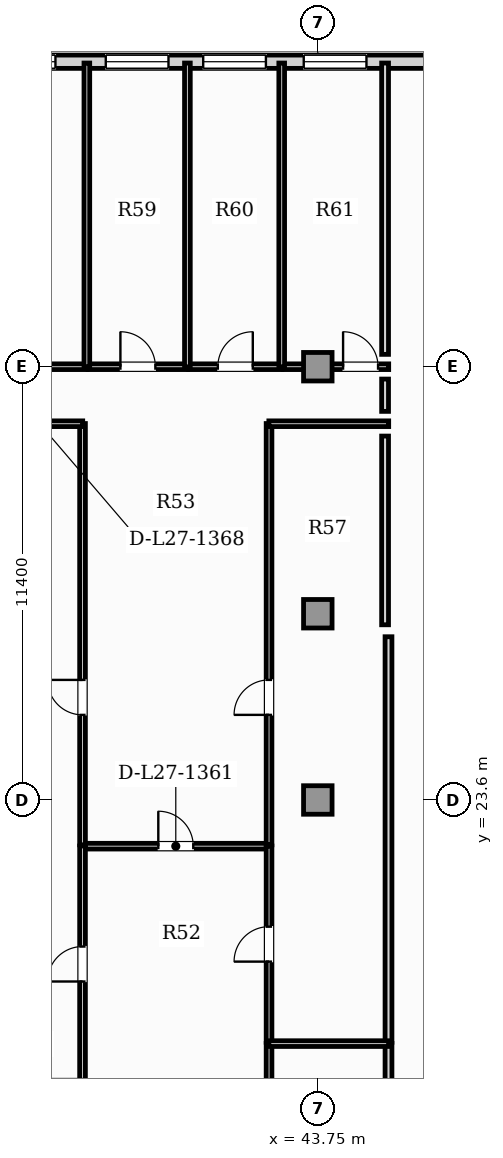
"""IFC4 building model, lengths in metres.
Left out: names, types, materials, properties, quantities, classifications, styles, units other than length and angle.
Written with IfcOpenShell. Run it as: python <this file> out.ifc"""

import sys

from ifc_helpers import new_model, si_unit, direction, frame, frame_2d, origin, origin_2d, place, context, subcontext, project, spatial, rectangle, extrude, element, fill, save


model = new_model("IFC4")
c1 = context("Model", 3, precision=1e-05, world=origin(), true_north=direction((0.0, 1.0)))
c2 = subcontext(c1, "Body", "Model", "MODEL_VIEW")
j1 = project(units=[si_unit("LENGTHUNIT", "METRE"), si_unit("PLANEANGLEUNIT", "RADIAN")], contexts=[c1])
p1 = place(None, origin())
s1 = spatial("IfcSite", under=j1, at=p1, CompositionType="ELEMENT")
p2 = place(p1, origin())
s2 = spatial("IfcBuilding", under=s1, at=p2, CompositionType="ELEMENT")
p3 = place(p2, frame((0.0, 0.0, 111.85)))
s3 = spatial("IfcBuildingStorey", under=s2, at=p3, CompositionType="ELEMENT", Elevation=111.85)
for number, where, z_axis, x_axis in (
    (1, (43.75, 23.6, 0.0), (0.0, 0.0, 1.0), (1.0, 0.0, 0.0)),
    (2, (43.75, 28.5, 0.0), (0.0, 0.0, 1.0), (1.0, 0.0, 0.0)),
    (3, (43.75, 35.0, 0.0), (0.0, 0.0, 1.0), (1.0, 0.0, 0.0)),
):
    element("IfcColumn", number, at=place(p3, frame(where, z_axis=z_axis, x_axis=x_axis)), inside=s3, PredefinedType="COLUMN", context=c2, shape_type="SweptSolid", body=[
        extrude(rectangle(XDim=0.75, YDim=0.75, at=origin_2d()), origin(), (0.0, 0.0, 1.0), 3.85),
    ])
p4 = place(p3, frame((51.66, 43.025, 0.0), z_axis=(0.0, 0.0, 1.0), x_axis=(-1.0, 0.0, 0.0)))
e4 = element("IfcWall", 4, at=p4, inside=s3, PredefinedType="SOLIDWALL", context=c2, shape_type="SweptSolid", body=[
    extrude(rectangle(XDim=45.82, YDim=0.35, at=frame_2d((22.91, 0.0))), origin(), (0.0, 0.0, 1.0), 3.6),
])
p5 = place(p4, frame((42.393, 0.0, 0.88)))
e5 = element("IfcOpeningElement", 5, at=p5, cuts=e4, PredefinedType="OPENING", context=c2, shape_type="SweptSolid", body=[
    extrude(rectangle(XDim=1.65, YDim=2.0, at=frame_2d((0.825, 1.0))), frame((0.0, 0.185, 0.0), z_axis=(0.0, -1.0, 0.0), x_axis=(1.0, 0.0, 0.0)), (0.0, 0.0, 1.0), 0.37),
])
p6 = place(p4, frame((1.778, 0.0, 0.88)))
e6 = element("IfcOpeningElement", 6, at=p6, cuts=e4, PredefinedType="OPENING", context=c2, shape_type="SweptSolid", body=[
    extrude(rectangle(XDim=1.65, YDim=2.0, at=frame_2d((0.825, 1.0))), frame((0.0, 0.185, 0.0), z_axis=(0.0, -1.0, 0.0), x_axis=(1.0, 0.0, 0.0)), (0.0, 0.0, 1.0), 0.37),
])
p7 = place(p4, frame((37.293, 0.0, 0.88)))
e7 = element("IfcOpeningElement", 7, at=p7, cuts=e4, PredefinedType="OPENING", context=c2, shape_type="SweptSolid", body=[
    extrude(rectangle(XDim=1.65, YDim=2.0, at=frame_2d((0.825, 1.0))), frame((0.0, 0.185, 0.0), z_axis=(0.0, -1.0, 0.0), x_axis=(1.0, 0.0, 0.0)), (0.0, 0.0, 1.0), 0.37),
])
p8 = place(p4, frame((34.694, 0.0, 0.95)))
e8 = element("IfcOpeningElement", 8, at=p8, cuts=e4, PredefinedType="OPENING", context=c2, shape_type="SweptSolid", body=[
    extrude(rectangle(XDim=0.9, YDim=1.5, at=frame_2d((0.45, 0.75))), frame((0.0, 0.185, 0.0), z_axis=(0.0, -1.0, 0.0), x_axis=(1.0, 0.0, 0.0)), (0.0, 0.0, 1.0), 0.37),
])
p9 = place(p4, frame((31.734, 0.0, 1.82)))
e9 = element("IfcOpeningElement", 9, at=p9, cuts=e4, PredefinedType="OPENING", context=c2, shape_type="SweptSolid", body=[
    extrude(rectangle(XDim=0.9, YDim=1.05, at=frame_2d((0.45, 0.525))), frame((0.0, 0.185, 0.0), z_axis=(0.0, -1.0, 0.0), x_axis=(1.0, 0.0, 0.0)), (0.0, 0.0, 1.0), 0.37),
])
p10 = place(p4, frame((29.11, 0.0, 0.88)))
e10 = element("IfcOpeningElement", 10, at=p10, cuts=e4, PredefinedType="OPENING", context=c2, shape_type="SweptSolid", body=[
    extrude(rectangle(XDim=1.65, YDim=2.0, at=frame_2d((0.825, 1.0))), frame((0.0, 0.185, 0.0), z_axis=(0.0, -1.0, 0.0), x_axis=(1.0, 0.0, 0.0)), (0.0, 0.0, 1.0), 0.37),
])
p11 = place(p4, frame((26.053, 0.0, 0.88)))
e11 = element("IfcOpeningElement", 11, at=p11, cuts=e4, PredefinedType="OPENING", context=c2, shape_type="SweptSolid", body=[
    extrude(rectangle(XDim=1.65, YDim=2.0, at=frame_2d((0.825, 1.0))), frame((0.0, 0.185, 0.0), z_axis=(0.0, -1.0, 0.0), x_axis=(1.0, 0.0, 0.0)), (0.0, 0.0, 1.0), 0.37),
])
p12 = place(p4, frame((23.243, 0.0, 0.88)))
e12 = element("IfcOpeningElement", 12, at=p12, cuts=e4, PredefinedType="OPENING", context=c2, shape_type="SweptSolid", body=[
    extrude(rectangle(XDim=1.65, YDim=2.0, at=frame_2d((0.825, 1.0))), frame((0.0, 0.185, 0.0), z_axis=(0.0, -1.0, 0.0), x_axis=(1.0, 0.0, 0.0)), (0.0, 0.0, 1.0), 0.37),
])
p13 = place(p4, frame((20.844, 0.0, 0.88)))
e13 = element("IfcOpeningElement", 13, at=p13, cuts=e4, PredefinedType="OPENING", context=c2, shape_type="SweptSolid", body=[
    extrude(rectangle(XDim=1.65, YDim=2.0, at=frame_2d((0.825, 1.0))), frame((0.0, 0.185, 0.0), z_axis=(0.0, -1.0, 0.0), x_axis=(1.0, 0.0, 0.0)), (0.0, 0.0, 1.0), 0.37),
])
p14 = place(p4, frame((18.034, 0.0, 0.88)))
e14 = element("IfcOpeningElement", 14, at=p14, cuts=e4, PredefinedType="OPENING", context=c2, shape_type="SweptSolid", body=[
    extrude(rectangle(XDim=1.65, YDim=2.0, at=frame_2d((0.825, 1.0))), frame((0.0, 0.185, 0.0), z_axis=(0.0, -1.0, 0.0), x_axis=(1.0, 0.0, 0.0)), (0.0, 0.0, 1.0), 0.37),
])
p15 = place(p4, frame((14.813, 0.0, 0.88)))
e15 = element("IfcOpeningElement", 15, at=p15, cuts=e4, PredefinedType="OPENING", context=c2, shape_type="SweptSolid", body=[
    extrude(rectangle(XDim=1.65, YDim=2.0, at=frame_2d((0.825, 1.0))), frame((0.0, 0.185, 0.0), z_axis=(0.0, -1.0, 0.0), x_axis=(1.0, 0.0, 0.0)), (0.0, 0.0, 1.0), 0.37),
])
p16 = place(p4, frame((11.839, 0.0, 0.88)))
e16 = element("IfcOpeningElement", 16, at=p16, cuts=e4, PredefinedType="OPENING", context=c2, shape_type="SweptSolid", body=[
    extrude(rectangle(XDim=1.65, YDim=2.0, at=frame_2d((0.825, 1.0))), frame((0.0, 0.185, 0.0), z_axis=(0.0, -1.0, 0.0), x_axis=(1.0, 0.0, 0.0)), (0.0, 0.0, 1.0), 0.37),
])
p17 = place(p4, frame((9.276, 0.0, 0.88)))
e17 = element("IfcOpeningElement", 17, at=p17, cuts=e4, PredefinedType="OPENING", context=c2, shape_type="SweptSolid", body=[
    extrude(rectangle(XDim=1.65, YDim=2.0, at=frame_2d((0.825, 1.0))), frame((0.0, 0.185, 0.0), z_axis=(0.0, -1.0, 0.0), x_axis=(1.0, 0.0, 0.0)), (0.0, 0.0, 1.0), 0.37),
])
p18 = place(p4, frame((6.63, 0.0, 0.88)))
e18 = element("IfcOpeningElement", 18, at=p18, cuts=e4, PredefinedType="OPENING", context=c2, shape_type="SweptSolid", body=[
    extrude(rectangle(XDim=1.65, YDim=2.0, at=frame_2d((0.825, 1.0))), frame((0.0, 0.185, 0.0), z_axis=(0.0, -1.0, 0.0), x_axis=(1.0, 0.0, 0.0)), (0.0, 0.0, 1.0), 0.37),
])
p19 = place(p3, frame((45.61, 13.765, 0.0), z_axis=(0.0, 0.0, 1.0), x_axis=(0.0, 1.0, 0.0)))
e19 = element("IfcWall", 19, at=p19, inside=s3, PredefinedType="PARTITIONING", context=c2, shape_type="SweptSolid", body=[
    extrude(rectangle(XDim=3.43, YDim=0.18, at=frame_2d((1.715, 0.0))), origin(), (0.0, 0.0, 1.0), 3.6),
])
p20 = place(p3, frame((45.61, 17.225, 0.0), z_axis=(0.0, 0.0, 1.0), x_axis=(0.0, 1.0, 0.0)))
e20 = element("IfcWall", 20, at=p20, inside=s3, PredefinedType="PARTITIONING", context=c2, shape_type="SweptSolid", body=[
    extrude(rectangle(XDim=10.67, YDim=0.18, at=frame_2d((5.335, 0.0))), origin(), (0.0, 0.0, 1.0), 3.6),
])
p21 = place(p3, frame((37.554, 22.385, 0.0), z_axis=(0.0, 0.0, 1.0), x_axis=(1.0, 0.0, 0.0)))
e21 = element("IfcWall", 21, at=p21, inside=s3, PredefinedType="PARTITIONING", context=c2, shape_type="SweptSolid", body=[
    extrude(rectangle(XDim=4.917, YDim=0.15, at=frame_2d((2.459, 0.0))), origin(), (0.0, 0.0, 1.0), 3.6),
])
p22 = place(p21, frame((1.999, 0.0, 0.0)))
e22 = element("IfcOpeningElement", 22, at=p22, cuts=e21, PredefinedType="OPENING", context=c2, shape_type="SweptSolid", body=[
    extrude(rectangle(XDim=0.92, YDim=2.1, at=frame_2d((0.46, 1.05))), frame((0.0, 0.085, 0.0), z_axis=(0.0, -1.0, 0.0), x_axis=(1.0, 0.0, 0.0)), (0.0, 0.0, 1.0), 0.17),
])
p23 = place(p3, frame((37.559, 16.178, 0.0), z_axis=(0.0, 0.0, 1.0), x_axis=(0.0, 1.0, 0.0)))
e23 = element("IfcWall", 23, at=p23, inside=s3, PredefinedType="PARTITIONING", context=c2, shape_type="SweptSolid", body=[
    extrude(rectangle(XDim=6.211, YDim=0.15, at=frame_2d((3.105, 0.0))), origin(), (0.0, 0.0, 1.0), 3.6),
])
p24 = place(p23, frame((2.646, 0.0, 0.0)))
e24 = element("IfcOpeningElement", 24, at=p24, cuts=e23, PredefinedType="OPENING", context=c2, shape_type="SweptSolid", body=[
    extrude(rectangle(XDim=0.92, YDim=2.1, at=frame_2d((0.46, 1.05))), frame((0.0, 0.085, 0.0), z_axis=(0.0, -1.0, 0.0), x_axis=(1.0, 0.0, 0.0)), (0.0, 0.0, 1.0), 0.17),
])
p25 = place(p3, frame((42.467, 13.765, 0.0), z_axis=(0.0, 0.0, 1.0), x_axis=(0.0, 1.0, 0.0)))
e25 = element("IfcWall", 25, at=p25, inside=s3, PredefinedType="PARTITIONING", context=c2, shape_type="SweptSolid", body=[
    extrude(rectangle(XDim=3.43, YDim=0.15, at=frame_2d((1.715, 0.0))), origin(), (0.0, 0.0, 1.0), 3.6),
])
p26 = place(p25, frame((1.255, 0.0, 0.0)))
e26 = element("IfcOpeningElement", 26, at=p26, cuts=e25, PredefinedType="OPENING", context=c2, shape_type="SweptSolid", body=[
    extrude(rectangle(XDim=0.92, YDim=2.1, at=frame_2d((0.46, 1.05))), frame((0.0, 0.085, 0.0), z_axis=(0.0, -1.0, 0.0), x_axis=(1.0, 0.0, 0.0)), (0.0, 0.0, 1.0), 0.17),
])
p27 = place(p3, frame((42.467, 17.225, 0.0), z_axis=(0.0, 0.0, 1.0), x_axis=(0.0, 1.0, 0.0)))
e27 = element("IfcWall", 27, at=p27, inside=s3, PredefinedType="PARTITIONING", context=c2, shape_type="SweptSolid", body=[
    extrude(rectangle(XDim=5.165, YDim=0.15, at=frame_2d((2.583, 0.0))), origin(), (0.0, 0.0, 1.0), 3.6),
])
p28 = place(p27, frame((2.122, 0.0, 0.0)))
e28 = element("IfcOpeningElement", 28, at=p28, cuts=e27, PredefinedType="OPENING", context=c2, shape_type="SweptSolid", body=[
    extrude(rectangle(XDim=0.92, YDim=2.1, at=frame_2d((0.46, 1.05))), frame((0.0, 0.085, 0.0), z_axis=(0.0, -1.0, 0.0), x_axis=(1.0, 0.0, 0.0)), (0.0, 0.0, 1.0), 0.17),
])
p29 = place(p3, frame((37.559, 22.419, 0.0), z_axis=(0.0, 0.0, 1.0), x_axis=(0.0, 1.0, 0.0)))
e29 = element("IfcWall", 29, at=p29, inside=s3, PredefinedType="PARTITIONING", context=c2, shape_type="SweptSolid", body=[
    extrude(rectangle(XDim=11.085, YDim=0.15, at=frame_2d((5.543, 0.0))), origin(), (0.0, 0.0, 1.0), 3.6),
])
p30 = place(p29, frame((3.42, 0.0, 0.0)))
e30 = element("IfcOpeningElement", 30, at=p30, cuts=e29, PredefinedType="OPENING", context=c2, shape_type="SweptSolid", body=[
    extrude(rectangle(XDim=0.92, YDim=2.1, at=frame_2d((0.46, 1.05))), frame((0.0, 0.085, 0.0), z_axis=(0.0, -1.0, 0.0), x_axis=(1.0, 0.0, 0.0)), (0.0, 0.0, 1.0), 0.17),
])
p31 = place(p3, frame((34.405, 33.5, 0.0), z_axis=(0.0, 0.0, 1.0), x_axis=(1.0, 0.0, 0.0)))
e31 = element("IfcWall", 31, at=p31, inside=s3, PredefinedType="PARTITIONING", context=c2, shape_type="SweptSolid", body=[
    extrude(rectangle(XDim=3.159, YDim=0.15, at=frame_2d((1.58, 0.0))), origin(), (0.0, 0.0, 1.0), 3.6),
])
p32 = place(p3, frame((42.467, 22.419, 0.0), z_axis=(0.0, 0.0, 1.0), x_axis=(0.0, 1.0, 0.0)))
e32 = element("IfcWall", 32, at=p32, inside=s3, PredefinedType="PARTITIONING", context=c2, shape_type="SweptSolid", body=[
    extrude(rectangle(XDim=11.085, YDim=0.15, at=frame_2d((5.543, 0.0))), origin(), (0.0, 0.0, 1.0), 3.6),
])
p33 = place(p32, frame((3.42, 0.0, 0.0)))
e33 = element("IfcOpeningElement", 33, at=p33, cuts=e32, PredefinedType="OPENING", context=c2, shape_type="SweptSolid", body=[
    extrude(rectangle(XDim=0.92, YDim=2.1, at=frame_2d((0.46, 1.05))), frame((0.0, 0.085, 0.0), z_axis=(0.0, -1.0, 0.0), x_axis=(1.0, 0.0, 0.0)), (0.0, 0.0, 1.0), 0.17),
])
p34 = place(p3, frame((42.462, 33.5, 0.0), z_axis=(0.0, 0.0, 1.0), x_axis=(1.0, 0.0, 0.0)))
e34 = element("IfcWall", 34, at=p34, inside=s3, PredefinedType="PARTITIONING", context=c2, shape_type="SweptSolid", body=[
    extrude(rectangle(XDim=3.153, YDim=0.15, at=frame_2d((1.577, 0.0))), origin(), (0.0, 0.0, 1.0), 3.6),
])
p35 = place(p3, frame((34.405, 35.0, 0.0), z_axis=(0.0, 0.0, 1.0), x_axis=(1.0, 0.0, 0.0)))
e35 = element("IfcWall", 35, at=p35, inside=s3, PredefinedType="PARTITIONING", context=c2, shape_type="SweptSolid", body=[
    extrude(rectangle(XDim=3.273, YDim=0.15, at=frame_2d((1.636, 0.0))), origin(), (0.0, 0.0, 1.0), 2.983),
])
p36 = place(p35, frame((0.28, 0.0, 0.0)))
e36 = element("IfcOpeningElement", 36, at=p36, cuts=e35, PredefinedType="OPENING", context=c2, shape_type="SweptSolid", body=[
    extrude(rectangle(XDim=0.92, YDim=2.1, at=frame_2d((0.46, 1.05))), frame((0.0, 0.085, 0.0), z_axis=(0.0, -1.0, 0.0), x_axis=(1.0, 0.0, 0.0)), (0.0, 0.0, 1.0), 0.17),
])
p37 = place(p3, frame((37.708, 35.0, 0.0), z_axis=(0.0, 0.0, 1.0), x_axis=(1.0, 0.0, 0.0)))
e37 = element("IfcWall", 37, at=p37, inside=s3, PredefinedType="PARTITIONING", context=c2, shape_type="SweptSolid", body=[
    extrude(rectangle(XDim=2.616, YDim=0.15, at=frame_2d((1.308, 0.0))), origin(), (0.0, 0.0, 1.0), 2.983),
])
p38 = place(p37, frame((0.848, 0.0, 0.0)))
e38 = element("IfcOpeningElement", 38, at=p38, cuts=e37, PredefinedType="OPENING", context=c2, shape_type="SweptSolid", body=[
    extrude(rectangle(XDim=0.92, YDim=2.1, at=frame_2d((0.46, 1.05))), frame((0.0, 0.085, 0.0), z_axis=(0.0, -1.0, 0.0), x_axis=(1.0, 0.0, 0.0)), (0.0, 0.0, 1.0), 0.17),
])
p39 = place(p3, frame((40.354, 35.0, 0.0), z_axis=(0.0, 0.0, 1.0), x_axis=(1.0, 0.0, 0.0)))
e39 = element("IfcWall", 39, at=p39, inside=s3, PredefinedType="PARTITIONING", context=c2, shape_type="SweptSolid", body=[
    extrude(rectangle(XDim=2.451, YDim=0.15, at=frame_2d((1.226, 0.0))), origin(), (0.0, 0.0, 1.0), 2.983),
])
p40 = place(p39, frame((0.766, 0.0, 0.0)))
e40 = element("IfcOpeningElement", 40, at=p40, cuts=e39, PredefinedType="OPENING", context=c2, shape_type="SweptSolid", body=[
    extrude(rectangle(XDim=0.92, YDim=2.1, at=frame_2d((0.46, 1.05))), frame((0.0, 0.085, 0.0), z_axis=(0.0, -1.0, 0.0), x_axis=(1.0, 0.0, 0.0)), (0.0, 0.0, 1.0), 0.17),
])
p41 = place(p3, frame((42.835, 35.0, 0.0), z_axis=(0.0, 0.0, 1.0), x_axis=(1.0, 0.0, 0.0)))
e41 = element("IfcWall", 41, at=p41, inside=s3, PredefinedType="PARTITIONING", context=c2, shape_type="SweptSolid", body=[
    extrude(rectangle(XDim=2.78, YDim=0.15, at=frame_2d((1.39, 0.0))), origin(), (0.0, 0.0, 1.0), 2.983),
])
p42 = place(p41, frame((1.58, 0.0, 0.0)))
e42 = element("IfcOpeningElement", 42, at=p42, cuts=e41, PredefinedType="OPENING", context=c2, shape_type="SweptSolid", body=[
    extrude(rectangle(XDim=0.92, YDim=2.1, at=frame_2d((0.46, 1.05))), frame((0.0, 0.085, 0.0), z_axis=(0.0, -1.0, 0.0), x_axis=(1.0, 0.0, 0.0)), (0.0, 0.0, 1.0), 0.17),
])
p43 = place(p3, frame((42.462, 17.19, 0.0), z_axis=(0.0, 0.0, 1.0), x_axis=(1.0, 0.0, 0.0)))
e43 = element("IfcWall", 43, at=p43, inside=s3, PredefinedType="PARTITIONING", context=c2, shape_type="SweptSolid", body=[
    extrude(rectangle(XDim=3.153, YDim=0.15, at=frame_2d((1.577, 0.0))), origin(), (0.0, 0.0, 1.0), 3.6),
])
for number, where, z_axis, x_axis in (
    (44, (37.673, 34.995, 0.0), (0.0, 0.0, 1.0), (0.0, 1.0, 0.0)),
    (45, (40.319, 34.995, 0.0), (0.0, 0.0, 1.0), (0.0, 1.0, 0.0)),
    (46, (42.8, 34.995, 0.0), (0.0, 0.0, 1.0), (0.0, 1.0, 0.0)),
):
    element("IfcWall", number, at=place(p3, frame(where, z_axis=z_axis, x_axis=x_axis)), inside=s3, PredefinedType="PARTITIONING", context=c2, shape_type="SweptSolid", body=[
        extrude(rectangle(XDim=7.995, YDim=0.15, at=frame_2d((3.998, 0.0))), origin(), (0.0, 0.0, 1.0), 3.6),
    ])
p44 = place(p3, frame((45.52, 34.675, 0.0), z_axis=(0.0, 0.0, 1.0), x_axis=(0.0, -1.0, 0.0)))
e47 = element("IfcWall", 47, at=p44, inside=s3, PredefinedType="PARTITIONING", context=c2, shape_type="SweptSolid", body=[
    extrude(rectangle(XDim=0.85, YDim=0.18, at=frame_2d((0.425, 0.0))), origin(), (0.0, 0.0, 1.0), 3.6),
])
p45 = place(p3, frame((45.52, 33.175, 0.0), z_axis=(0.0, 0.0, 1.0), x_axis=(0.0, -1.0, 0.0)))
e48 = element("IfcWall", 48, at=p45, inside=s3, PredefinedType="PARTITIONING", context=c2, shape_type="SweptSolid", body=[
    extrude(rectangle(XDim=4.965, YDim=0.18, at=frame_2d((2.482, 0.0))), origin(), (0.0, 0.0, 1.0), 3.6),
])
p46 = place(p3, frame((45.52, 42.99, 0.0), z_axis=(0.0, 0.0, 1.0), x_axis=(0.0, -1.0, 0.0)))
e49 = element("IfcWall", 49, at=p46, inside=s3, PredefinedType="PARTITIONING", context=c2, shape_type="SweptSolid", body=[
    extrude(rectangle(XDim=7.665, YDim=0.18, at=frame_2d((3.833, 0.0))), origin(), (0.0, 0.0, 1.0), 3.6),
])
p47 = place(p15, origin())
e50 = element("IfcWindow", 50, at=p47, inside=s3, PartitioningType="SINGLE_PANEL", PredefinedType="WINDOW", context=c2, shape_type="SweptSolid", body=[
    extrude(rectangle(XDim=1.65, YDim=2.0, at=frame_2d((0.825, 1.0))), frame((0.0, 0.03, 0.0), z_axis=(0.0, -1.0, 0.0), x_axis=(1.0, 0.0, 0.0)), (0.0, 0.0, 1.0), 0.06),
])
fill(e15, e50)
p48 = place(p16, origin())
e51 = element("IfcWindow", 51, at=p48, inside=s3, PartitioningType="SINGLE_PANEL", PredefinedType="WINDOW", context=c2, shape_type="SweptSolid", body=[
    extrude(rectangle(XDim=1.65, YDim=2.0, at=frame_2d((0.825, 1.0))), frame((0.0, 0.03, 0.0), z_axis=(0.0, -1.0, 0.0), x_axis=(1.0, 0.0, 0.0)), (0.0, 0.0, 1.0), 0.06),
])
fill(e16, e51)
p49 = place(p17, origin())
e52 = element("IfcWindow", 52, at=p49, inside=s3, PartitioningType="SINGLE_PANEL", PredefinedType="WINDOW", context=c2, shape_type="SweptSolid", body=[
    extrude(rectangle(XDim=1.65, YDim=2.0, at=frame_2d((0.825, 1.0))), frame((0.0, 0.03, 0.0), z_axis=(0.0, -1.0, 0.0), x_axis=(1.0, 0.0, 0.0)), (0.0, 0.0, 1.0), 0.06),
])
fill(e17, e52)
p50 = place(p18, origin())
e53 = element("IfcWindow", 53, at=p50, inside=s3, PartitioningType="SINGLE_PANEL", PredefinedType="WINDOW", context=c2, shape_type="SweptSolid", body=[
    extrude(rectangle(XDim=1.65, YDim=2.0, at=frame_2d((0.825, 1.0))), frame((0.0, 0.03, 0.0), z_axis=(0.0, -1.0, 0.0), x_axis=(1.0, 0.0, 0.0)), (0.0, 0.0, 1.0), 0.06),
])
fill(e18, e53)
p51 = place(p22, origin())
e54 = element("IfcDoor", 54, at=p51, inside=s3, OperationType="SINGLE_SWING_LEFT", PredefinedType="DOOR", context=c2, shape_type="SweptSolid", body=[
    extrude(rectangle(XDim=0.92, YDim=2.1, at=frame_2d((0.46, 1.05))), frame((0.0, 0.025, 0.0), z_axis=(0.0, -1.0, 0.0), x_axis=(1.0, 0.0, 0.0)), (0.0, 0.0, 1.0), 0.05),
])
fill(e22, e54)
p52 = place(p24, origin())
e55 = element("IfcDoor", 55, at=p52, inside=s3, OperationType="SINGLE_SWING_LEFT", PredefinedType="DOOR", context=c2, shape_type="SweptSolid", body=[
    extrude(rectangle(XDim=0.92, YDim=2.1, at=frame_2d((0.46, 1.05))), frame((0.0, 0.025, 0.0), z_axis=(0.0, -1.0, 0.0), x_axis=(1.0, 0.0, 0.0)), (0.0, 0.0, 1.0), 0.05),
])
fill(e24, e55)
p53 = place(p28, origin())
e56 = element("IfcDoor", 56, at=p53, inside=s3, OperationType="SINGLE_SWING_LEFT", PredefinedType="DOOR", context=c2, shape_type="SweptSolid", body=[
    extrude(rectangle(XDim=0.92, YDim=2.1, at=frame_2d((0.46, 1.05))), frame((0.0, 0.025, 0.0), z_axis=(0.0, -1.0, 0.0), x_axis=(1.0, 0.0, 0.0)), (0.0, 0.0, 1.0), 0.05),
])
fill(e28, e56)
p54 = place(p30, origin())
e57 = element("IfcDoor", 57, at=p54, inside=s3, OperationType="SINGLE_SWING_RIGHT", PredefinedType="DOOR", context=c2, shape_type="SweptSolid", body=[
    extrude(rectangle(XDim=0.92, YDim=2.1, at=frame_2d((0.46, 1.05))), frame((0.0, 0.025, 0.0), z_axis=(0.0, -1.0, 0.0), x_axis=(1.0, 0.0, 0.0)), (0.0, 0.0, 1.0), 0.05),
])
fill(e30, e57)
p55 = place(p33, origin())
e58 = element("IfcDoor", 58, at=p55, inside=s3, OperationType="SINGLE_SWING_LEFT", PredefinedType="DOOR", context=c2, shape_type="SweptSolid", body=[
    extrude(rectangle(XDim=0.92, YDim=2.1, at=frame_2d((0.46, 1.05))), frame((0.0, 0.025, 0.0), z_axis=(0.0, -1.0, 0.0), x_axis=(1.0, 0.0, 0.0)), (0.0, 0.0, 1.0), 0.05),
])
fill(e33, e58)
p56 = place(p38, origin())
e59 = element("IfcDoor", 59, at=p56, inside=s3, OperationType="SINGLE_SWING_LEFT", PredefinedType="DOOR", context=c2, shape_type="SweptSolid", body=[
    extrude(rectangle(XDim=0.92, YDim=2.1, at=frame_2d((0.46, 1.05))), frame((0.0, 0.025, 0.0), z_axis=(0.0, -1.0, 0.0), x_axis=(1.0, 0.0, 0.0)), (0.0, 0.0, 1.0), 0.05),
])
fill(e38, e59)
p57 = place(p40, origin())
e60 = element("IfcDoor", 60, at=p57, inside=s3, OperationType="SINGLE_SWING_RIGHT", PredefinedType="DOOR", context=c2, shape_type="SweptSolid", body=[
    extrude(rectangle(XDim=0.92, YDim=2.1, at=frame_2d((0.46, 1.05))), frame((0.0, 0.025, 0.0), z_axis=(0.0, -1.0, 0.0), x_axis=(1.0, 0.0, 0.0)), (0.0, 0.0, 1.0), 0.05),
])
fill(e40, e60)
p58 = place(p42, origin())
e61 = element("IfcDoor", 61, at=p58, inside=s3, OperationType="SINGLE_SWING_LEFT", PredefinedType="DOOR", context=c2, shape_type="SweptSolid", body=[
    extrude(rectangle(XDim=0.92, YDim=2.1, at=frame_2d((0.46, 1.05))), frame((0.0, 0.025, 0.0), z_axis=(0.0, -1.0, 0.0), x_axis=(1.0, 0.0, 0.0)), (0.0, 0.0, 1.0), 0.05),
])
fill(e42, e61)
save(model, sys.argv[1])
